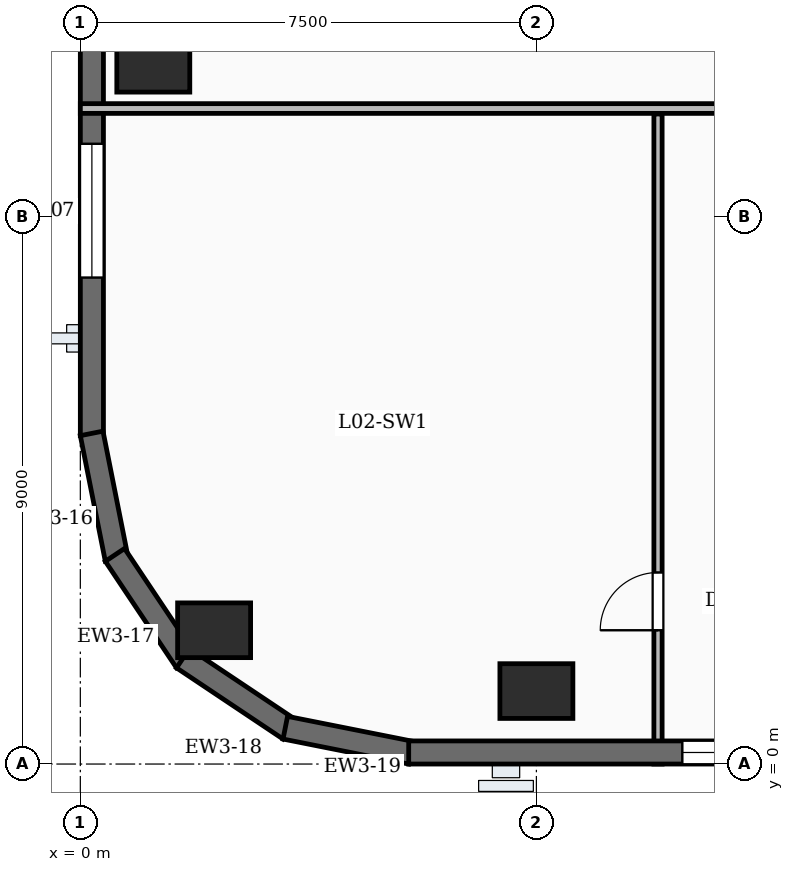
"""IFC4 building model, lengths in metres.
Left out: names, types, materials, properties, quantities, classifications, styles, units other than length and angle.
Written with IfcOpenShell. Run it as: python <this file> out.ifc"""

import sys

from ifc_helpers import new_model, si_unit, direction, frame, frame_2d, origin, origin_2d, place, context, subcontext, project, spatial, rectangle, extrude, element, fill, save


model = new_model("IFC4")
c1 = context("Model", 3, precision=1e-05, world=origin(), true_north=direction((0.0, 1.0)))
c2 = subcontext(c1, "Body", "Model", "MODEL_VIEW")
j1 = project(units=[si_unit("LENGTHUNIT", "METRE"), si_unit("PLANEANGLEUNIT", "RADIAN")], contexts=[c1])
p1 = place(None, origin())
s1 = spatial("IfcSite", under=j1, at=p1, CompositionType="ELEMENT")
p2 = place(p1, origin())
s2 = spatial("IfcBuilding", under=s1, at=p2, CompositionType="ELEMENT")
p3 = place(p2, frame((0.0, 0.0, 13.0)))
s3 = spatial("IfcBuildingStorey", under=s2, at=p3, CompositionType="ELEMENT", Elevation=13.0)
for number, where, z_axis, x_axis in (
    (1, (2.2, 2.2, -0.35), (0.0, 0.0, 1.0), (1.0, 0.0, 0.0)),
    (2, (7.5, 1.2, -0.35), (0.0, 0.0, 1.0), (1.0, 0.0, 0.0)),
    (3, (1.2, 11.5, -0.35), (0.0, 0.0, 1.0), (1.0, 0.0, 0.0)),
):
    element("IfcColumn", number, at=place(p3, frame(where, z_axis=z_axis, x_axis=x_axis)), inside=s3, PredefinedType="COLUMN", context=c2, shape_type="SweptSolid", body=[
        extrude(rectangle(XDim=1.2, YDim=0.9, at=origin_2d()), origin(), (0.0, 0.0, 1.0), 5.0),
    ])
p4 = place(p3, frame((0.19, 5.4, 0.0), z_axis=(0.0, 0.0, 1.0), x_axis=(0.0, 1.0, 0.0)))
e4 = element("IfcWall", 4, at=p4, inside=s3, PredefinedType="SOLIDWALL", context=c2, shape_type="SweptSolid", body=[
    extrude(rectangle(XDim=43.7, YDim=0.38, at=frame_2d((21.85, 0.0))), origin(), (0.0, 0.0, 1.0), 4.65),
])
p5 = place(p4, frame((2.6, 0.0, 0.95)))
e5 = element("IfcOpeningElement", 5, at=p5, cuts=e4, PredefinedType="OPENING", context=c2, shape_type="SweptSolid", body=[
    extrude(rectangle(XDim=2.2, YDim=2.5, at=frame_2d((1.1, 1.25))), frame((0.0, 0.2, 0.0), z_axis=(0.0, -1.0, 0.0), x_axis=(1.0, 0.0, 0.0)), (0.0, 0.0, 1.0), 0.4),
])
p6 = place(p4, frame((8.0, 0.0, 0.95)))
e6 = element("IfcOpeningElement", 6, at=p6, cuts=e4, PredefinedType="OPENING", context=c2, shape_type="SweptSolid", body=[
    extrude(rectangle(XDim=2.2, YDim=2.5, at=frame_2d((1.1, 1.25))), frame((0.0, 0.2, 0.0), z_axis=(0.0, -1.0, 0.0), x_axis=(1.0, 0.0, 0.0)), (0.0, 0.0, 1.0), 0.4),
])
p7 = place(p4, frame((18.8, 0.0, 0.95)))
e7 = element("IfcOpeningElement", 7, at=p7, cuts=e4, PredefinedType="OPENING", context=c2, shape_type="SweptSolid", body=[
    extrude(rectangle(XDim=2.2, YDim=2.5, at=frame_2d((1.1, 1.25))), frame((0.0, 0.2, 0.0), z_axis=(0.0, -1.0, 0.0), x_axis=(1.0, 0.0, 0.0)), (0.0, 0.0, 1.0), 0.4),
])
p8 = place(p4, frame((24.2, 0.0, 0.95)))
e8 = element("IfcOpeningElement", 8, at=p8, cuts=e4, PredefinedType="OPENING", context=c2, shape_type="SweptSolid", body=[
    extrude(rectangle(XDim=2.2, YDim=2.5, at=frame_2d((1.1, 1.25))), frame((0.0, 0.2, 0.0), z_axis=(0.0, -1.0, 0.0), x_axis=(1.0, 0.0, 0.0)), (0.0, 0.0, 1.0), 0.4),
])
p9 = place(p4, frame((29.6, 0.0, 0.95)))
e9 = element("IfcOpeningElement", 9, at=p9, cuts=e4, PredefinedType="OPENING", context=c2, shape_type="SweptSolid", body=[
    extrude(rectangle(XDim=2.2, YDim=2.5, at=frame_2d((1.1, 1.25))), frame((0.0, 0.2, 0.0), z_axis=(0.0, -1.0, 0.0), x_axis=(1.0, 0.0, 0.0)), (0.0, 0.0, 1.0), 0.4),
])
for number, where, z_axis, x_axis in (
    (10, (0.597, 3.371, 0.0), (0.0, 0.0, 1.0), (-0.195, 0.981, 0.0)),
    (11, (1.74, 1.687, 0.0), (0.0, 0.0, 1.0), (-0.556, 0.832, 0.0)),
    (12, (3.439, 0.569, 0.0), (0.0, 0.0, 1.0), (-0.832, 0.556, 0.0)),
    (13, (5.437, 0.186, 0.0), (0.0, 0.0, 1.0), (-0.981, 0.195, 0.0)),
):
    element("IfcWall", number, at=place(p3, frame(where, z_axis=z_axis, x_axis=x_axis)), inside=s3, PredefinedType="SOLIDWALL", context=c2, shape_type="SweptSolid", body=[
        extrude(rectangle(XDim=2.107, YDim=0.38, at=frame_2d((1.053, 0.0))), origin(), (0.0, 0.0, 1.0), 4.65),
    ])
p10 = place(p3, frame((74.1, 0.19, 0.0), z_axis=(0.0, 0.0, 1.0), x_axis=(-1.0, 0.0, 0.0)))
e14 = element("IfcWall", 14, at=p10, inside=s3, PredefinedType="SOLIDWALL", context=c2, shape_type="SweptSolid", body=[
    extrude(rectangle(XDim=68.7, YDim=0.38, at=frame_2d((34.35, 0.0))), origin(), (0.0, 0.0, 1.0), 4.65),
])
p11 = place(p10, frame((2.6, 0.0, 0.95)))
e15 = element("IfcOpeningElement", 15, at=p11, cuts=e14, PredefinedType="OPENING", context=c2, shape_type="SweptSolid", body=[
    extrude(rectangle(XDim=2.2, YDim=2.5, at=frame_2d((1.1, 1.25))), frame((0.0, 0.2, 0.0), z_axis=(0.0, -1.0, 0.0), x_axis=(1.0, 0.0, 0.0)), (0.0, 0.0, 1.0), 0.4),
])
p12 = place(p10, frame((18.8, 0.0, 0.95)))
e16 = element("IfcOpeningElement", 16, at=p12, cuts=e14, PredefinedType="OPENING", context=c2, shape_type="SweptSolid", body=[
    extrude(rectangle(XDim=2.2, YDim=2.5, at=frame_2d((1.1, 1.25))), frame((0.0, 0.2, 0.0), z_axis=(0.0, -1.0, 0.0), x_axis=(1.0, 0.0, 0.0)), (0.0, 0.0, 1.0), 0.4),
])
p13 = place(p10, frame((29.6, 0.0, 0.95)))
e17 = element("IfcOpeningElement", 17, at=p13, cuts=e14, PredefinedType="OPENING", context=c2, shape_type="SweptSolid", body=[
    extrude(rectangle(XDim=2.2, YDim=2.5, at=frame_2d((1.1, 1.25))), frame((0.0, 0.2, 0.0), z_axis=(0.0, -1.0, 0.0), x_axis=(1.0, 0.0, 0.0)), (0.0, 0.0, 1.0), 0.4),
])
p14 = place(p10, frame((40.4, 0.0, 0.95)))
e18 = element("IfcOpeningElement", 18, at=p14, cuts=e14, PredefinedType="OPENING", context=c2, shape_type="SweptSolid", body=[
    extrude(rectangle(XDim=2.2, YDim=2.5, at=frame_2d((1.1, 1.25))), frame((0.0, 0.2, 0.0), z_axis=(0.0, -1.0, 0.0), x_axis=(1.0, 0.0, 0.0)), (0.0, 0.0, 1.0), 0.4),
])
p15 = place(p10, frame((45.8, 0.0, 0.95)))
e19 = element("IfcOpeningElement", 19, at=p15, cuts=e14, PredefinedType="OPENING", context=c2, shape_type="SweptSolid", body=[
    extrude(rectangle(XDim=2.2, YDim=2.5, at=frame_2d((1.1, 1.25))), frame((0.0, 0.2, 0.0), z_axis=(0.0, -1.0, 0.0), x_axis=(1.0, 0.0, 0.0)), (0.0, 0.0, 1.0), 0.4),
])
p16 = place(p10, frame((51.2, 0.0, 0.95)))
e20 = element("IfcOpeningElement", 20, at=p16, cuts=e14, PredefinedType="OPENING", context=c2, shape_type="SweptSolid", body=[
    extrude(rectangle(XDim=2.2, YDim=2.5, at=frame_2d((1.1, 1.25))), frame((0.0, 0.2, 0.0), z_axis=(0.0, -1.0, 0.0), x_axis=(1.0, 0.0, 0.0)), (0.0, 0.0, 1.0), 0.4),
])
p17 = place(p10, frame((62.0, 0.0, 0.95)))
e21 = element("IfcOpeningElement", 21, at=p17, cuts=e14, PredefinedType="OPENING", context=c2, shape_type="SweptSolid", body=[
    extrude(rectangle(XDim=2.2, YDim=2.5, at=frame_2d((1.1, 1.25))), frame((0.0, 0.2, 0.0), z_axis=(0.0, -1.0, 0.0), x_axis=(1.0, 0.0, 0.0)), (0.0, 0.0, 1.0), 0.4),
])
p18 = place(p3, frame((9.5, 0.0, 0.0), z_axis=(0.0, 0.0, 1.0), x_axis=(0.0, 1.0, 0.0)))
e22 = element("IfcWall", 22, at=p18, inside=s3, PredefinedType="PARTITIONING", context=c2, shape_type="SweptSolid", body=[
    extrude(rectangle(XDim=10.69, YDim=0.135, at=frame_2d((5.345, 0.0))), origin(), (0.0, 0.0, 1.0), 3.71),
])
p19 = place(p18, frame((2.2, 0.0, 0.0)))
e23 = element("IfcOpeningElement", 23, at=p19, cuts=e22, PredefinedType="OPENING", context=c2, shape_type="SweptSolid", body=[
    extrude(rectangle(XDim=0.95, YDim=2.15, at=frame_2d((0.475, 1.075))), frame((0.0, 0.077, 0.0), z_axis=(0.0, -1.0, 0.0), x_axis=(1.0, 0.0, 0.0)), (0.0, 0.0, 1.0), 0.155),
])
p20 = place(p3, frame((0.0, 10.78, 0.0), z_axis=(0.0, 0.0, 1.0), x_axis=(1.0, 0.0, 0.0)))
e24 = element("IfcWall", 24, at=p20, inside=s3, PredefinedType="PARTITIONING", context=c2, shape_type="SweptSolid", body=[
    extrude(rectangle(XDim=24.8, YDim=0.16, at=frame_2d((12.4, 0.0))), origin(), (0.0, 0.0, 1.0), 3.71),
])
p21 = place(p20, frame((14.818, 0.0, 0.0)))
e25 = element("IfcOpeningElement", 25, at=p21, cuts=e24, PredefinedType="OPENING", context=c2, shape_type="SweptSolid", body=[
    extrude(rectangle(XDim=0.95, YDim=2.15, at=frame_2d((0.475, 1.075))), frame((0.0, 0.09, 0.0), z_axis=(0.0, -1.0, 0.0), x_axis=(1.0, 0.0, 0.0)), (0.0, 0.0, 1.0), 0.18),
])
p22 = place(p20, frame((20.67, 0.0, 0.0)))
e26 = element("IfcOpeningElement", 26, at=p22, cuts=e24, PredefinedType="OPENING", context=c2, shape_type="SweptSolid", body=[
    extrude(rectangle(XDim=0.95, YDim=2.15, at=frame_2d((0.475, 1.075))), frame((0.0, 0.09, 0.0), z_axis=(0.0, -1.0, 0.0), x_axis=(1.0, 0.0, 0.0)), (0.0, 0.0, 1.0), 0.18),
])
p23 = place(p5, origin())
e27 = element("IfcWindow", 27, at=p23, inside=s3, PartitioningType="DOUBLE_PANEL_VERTICAL", PredefinedType="WINDOW", context=c2, shape_type="SweptSolid", body=[
    extrude(rectangle(XDim=2.2, YDim=2.5, at=frame_2d((1.1, 1.25))), frame((0.0, 0.03, 0.0), z_axis=(0.0, -1.0, 0.0), x_axis=(1.0, 0.0, 0.0)), (0.0, 0.0, 1.0), 0.06),
])
fill(e5, e27)
p24 = place(p17, origin())
e28 = element("IfcWindow", 28, at=p24, inside=s3, PartitioningType="DOUBLE_PANEL_VERTICAL", PredefinedType="WINDOW", context=c2, shape_type="SweptSolid", body=[
    extrude(rectangle(XDim=2.2, YDim=2.5, at=frame_2d((1.1, 1.25))), frame((0.0, 0.03, 0.0), z_axis=(0.0, -1.0, 0.0), x_axis=(1.0, 0.0, 0.0)), (0.0, 0.0, 1.0), 0.06),
])
fill(e21, e28)
p25 = place(p19, origin())
e29 = element("IfcDoor", 29, at=p25, inside=s3, OperationType="SINGLE_SWING_LEFT", PredefinedType="DOOR", context=c2, shape_type="SweptSolid", body=[
    extrude(rectangle(XDim=0.95, YDim=2.15, at=frame_2d((0.475, 1.075))), frame((0.0, 0.025, 0.0), z_axis=(0.0, -1.0, 0.0), x_axis=(1.0, 0.0, 0.0)), (0.0, 0.0, 1.0), 0.05),
])
fill(e23, e29)
save(model, sys.argv[1])
